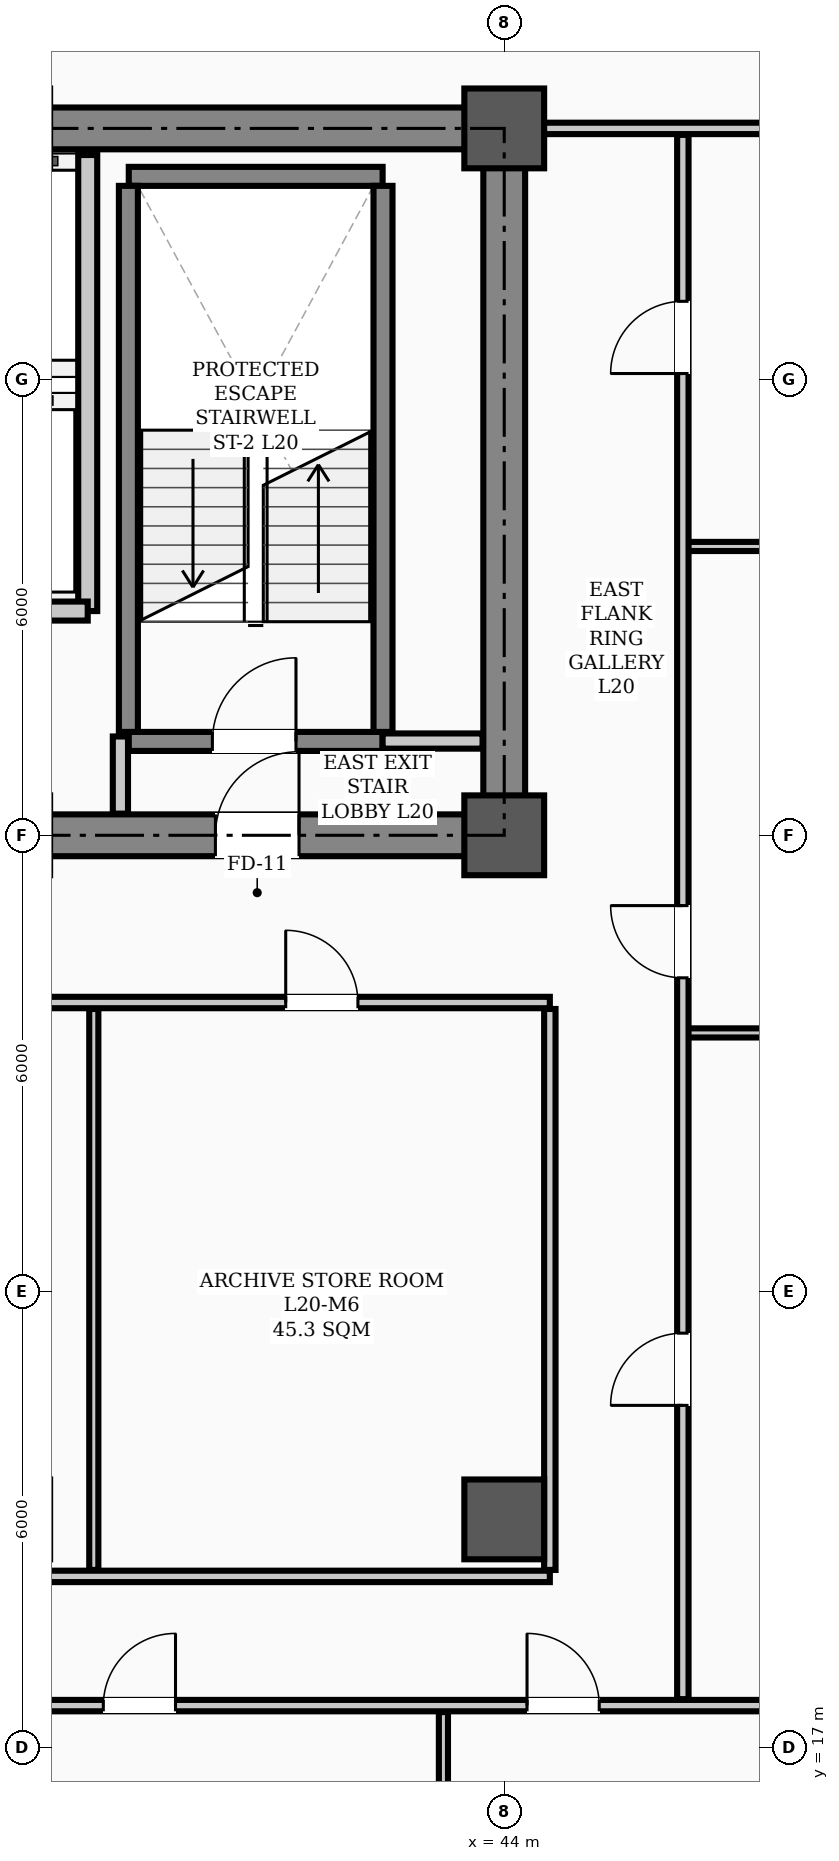
"""IFC4 building model, lengths in metres.
Left out: names, types, materials, properties, quantities, classifications, styles, units other than length and angle.
Written with IfcOpenShell. Run it as: python <this file> out.ifc"""

import sys

from ifc_helpers import new_model, si_unit, direction, frame, frame_2d, origin, origin_2d, place, context, subcontext, project, spatial, rectangle, hollow_rectangle, extrude, element, fill, save


model = new_model("IFC4")
c1 = context("Model", 3, precision=1e-05, world=origin(), true_north=direction((0.0, 1.0)))
c2 = subcontext(c1, "Body", "Model", "MODEL_VIEW")
j1 = project(units=[si_unit("LENGTHUNIT", "METRE"), si_unit("PLANEANGLEUNIT", "RADIAN")], contexts=[c1])
p1 = place(None, origin())
s1 = spatial("IfcSite", under=j1, at=p1, CompositionType="ELEMENT")
p2 = place(p1, origin())
s2 = spatial("IfcBuilding", under=s1, at=p2, CompositionType="ELEMENT")
p3 = place(p2, frame((0.0, 0.0, 81.1)))
s3 = spatial("IfcBuildingStorey", under=s2, at=p3, CompositionType="ELEMENT", Elevation=81.1)
for number, where, z_axis, x_axis in (
    (1, (44.0, 29.0, 0.0), (0.0, 0.0, 1.0), (1.0, 0.0, 0.0)),
    (2, (44.0, 38.3, 0.0), (0.0, 0.0, 1.0), (1.0, 0.0, 0.0)),
    (3, (44.0, 20.0, 0.0), (0.0, 0.0, 1.0), (1.0, 0.0, 0.0)),
):
    element("IfcColumn", number, at=place(p3, frame(where, z_axis=z_axis, x_axis=x_axis)), inside=s3, PredefinedType="COLUMN", context=c2, shape_type="SweptSolid", body=[
        extrude(hollow_rectangle(XDim=1.05, YDim=1.05, WallThickness=0.038, InnerFilletRadius=0.019, OuterFilletRadius=0.057, at=origin_2d()), origin(), (0.0, 0.0, 1.0), 3.9),
    ])
p4 = place(p3, frame((13.5, 29.0, 0.0), z_axis=(0.0, 0.0, 1.0), x_axis=(1.0, 0.0, 0.0)))
e4 = element("IfcWall", 4, at=p4, inside=s3, PredefinedType="SHEAR", context=c2, shape_type="SweptSolid", body=[
    extrude(rectangle(XDim=30.5, YDim=0.55, at=frame_2d((15.25, 0.0))), origin(), (0.0, 0.0, 1.0), 3.72),
])
p5 = place(p4, frame((1.75, 0.0, 0.0)))
e5 = element("IfcOpeningElement", 5, at=p5, cuts=e4, PredefinedType="OPENING", context=c2, shape_type="SweptSolid", body=[
    extrude(rectangle(XDim=1.1, YDim=2.08, at=frame_2d((0.55, 1.04))), frame((0.0, 0.285, 0.0), z_axis=(0.0, -1.0, 0.0), x_axis=(1.0, 0.0, 0.0)), (0.0, 0.0, 1.0), 0.57),
])
p6 = place(p4, frame((26.7, 0.0, 0.0)))
e6 = element("IfcOpeningElement", 6, at=p6, cuts=e4, PredefinedType="OPENING", context=c2, shape_type="SweptSolid", body=[
    extrude(rectangle(XDim=1.1, YDim=2.08, at=frame_2d((0.55, 1.04))), frame((0.0, 0.285, 0.0), z_axis=(0.0, -1.0, 0.0), x_axis=(1.0, 0.0, 0.0)), (0.0, 0.0, 1.0), 0.57),
])
p7 = place(p4, frame((6.8, 0.0, 0.0)))
e7 = element("IfcOpeningElement", 7, at=p7, cuts=e4, PredefinedType="OPENING", context=c2, shape_type="SweptSolid", body=[
    extrude(rectangle(XDim=1.1, YDim=2.08, at=frame_2d((0.55, 1.04))), frame((0.0, 0.285, 0.0), z_axis=(0.0, -1.0, 0.0), x_axis=(1.0, 0.0, 0.0)), (0.0, 0.0, 1.0), 0.57),
])
p8 = place(p4, frame((13.2, 0.0, 0.0)))
e8 = element("IfcOpeningElement", 8, at=p8, cuts=e4, PredefinedType="OPENING", context=c2, shape_type="SweptSolid", body=[
    extrude(rectangle(XDim=1.6, YDim=2.08, at=frame_2d((0.8, 1.04))), frame((0.0, 0.285, 0.0), z_axis=(0.0, -1.0, 0.0), x_axis=(1.0, 0.0, 0.0)), (0.0, 0.0, 1.0), 0.57),
])
p9 = place(p4, frame((19.53, 0.0, 0.0)))
e9 = element("IfcOpeningElement", 9, at=p9, cuts=e4, PredefinedType="OPENING", context=c2, shape_type="SweptSolid", body=[
    extrude(rectangle(XDim=0.9, YDim=2.08, at=frame_2d((0.45, 1.04))), frame((0.0, 0.285, 0.0), z_axis=(0.0, -1.0, 0.0), x_axis=(1.0, 0.0, 0.0)), (0.0, 0.0, 1.0), 0.57),
])
p10 = place(p4, frame((21.57, 0.0, 0.0)))
e10 = element("IfcOpeningElement", 10, at=p10, cuts=e4, PredefinedType="OPENING", context=c2, shape_type="SweptSolid", body=[
    extrude(rectangle(XDim=0.9, YDim=2.08, at=frame_2d((0.45, 1.04))), frame((0.0, 0.285, 0.0), z_axis=(0.0, -1.0, 0.0), x_axis=(1.0, 0.0, 0.0)), (0.0, 0.0, 1.0), 0.57),
])
p11 = place(p3, frame((13.5, 38.3, 0.0), z_axis=(0.0, 0.0, 1.0), x_axis=(1.0, 0.0, 0.0)))
e11 = element("IfcWall", 11, at=p11, inside=s3, PredefinedType="SHEAR", context=c2, shape_type="SweptSolid", body=[
    extrude(rectangle(XDim=30.5, YDim=0.55, at=frame_2d((15.25, 0.0))), origin(), (0.0, 0.0, 1.0), 3.72),
])
p12 = place(p3, frame((44.0, 29.35, 0.0), z_axis=(0.0, 0.0, 1.0), x_axis=(0.0, 1.0, 0.0)))
e12 = element("IfcWall", 12, at=p12, inside=s3, PredefinedType="SHEAR", context=c2, shape_type="SweptSolid", body=[
    extrude(rectangle(XDim=8.6, YDim=0.55, at=frame_2d((4.3, 0.0))), origin(), (0.0, 0.0, 1.0), 3.72),
])
p13 = place(p3, frame((39.06, 30.235, 0.0), z_axis=(0.0, 0.0, 1.0), x_axis=(1.0, 0.0, 0.0)))
e13 = element("IfcWall", 13, at=p13, inside=s3, PredefinedType="STANDARD", context=c2, shape_type="SweptSolid", body=[
    extrude(rectangle(XDim=3.34, YDim=0.25, at=frame_2d((1.67, 0.0))), origin(), (0.0, 0.0, 1.0), 3.72),
])
p14 = place(p13, frame((1.1, 0.0, 0.0)))
e14 = element("IfcOpeningElement", 14, at=p14, cuts=e13, PredefinedType="OPENING", context=c2, shape_type="SweptSolid", body=[
    extrude(rectangle(XDim=1.1, YDim=2.08, at=frame_2d((0.55, 1.04))), frame((0.0, 0.135, 0.0), z_axis=(0.0, -1.0, 0.0), x_axis=(1.0, 0.0, 0.0)), (0.0, 0.0, 1.0), 0.27),
])
p15 = place(p3, frame((39.06, 37.669, 0.0), z_axis=(0.0, 0.0, 1.0), x_axis=(1.0, 0.0, 0.0)))
e15 = element("IfcWall", 15, at=p15, inside=s3, PredefinedType="STANDARD", context=c2, shape_type="SweptSolid", body=[
    extrude(rectangle(XDim=3.34, YDim=0.25, at=frame_2d((1.67, 0.0))), origin(), (0.0, 0.0, 1.0), 3.72),
])
for number, where, z_axis, x_axis in (
    (16, (39.055, 30.36, 0.0), (0.0, 0.0, 1.0), (0.0, 1.0, 0.0)),
    (17, (42.405, 30.36, 0.0), (0.0, 0.0, 1.0), (0.0, 1.0, 0.0)),
):
    element("IfcWall", number, at=place(p3, frame(where, z_axis=z_axis, x_axis=x_axis)), inside=s3, PredefinedType="STANDARD", context=c2, shape_type="SweptSolid", body=[
        extrude(rectangle(XDim=7.184, YDim=0.25, at=frame_2d((3.592, 0.0))), origin(), (0.0, 0.0, 1.0), 3.72),
    ])
p16 = place(p3, frame((38.52, 31.95, 0.0), z_axis=(0.0, 0.0, 1.0), x_axis=(0.0, 1.0, 0.0)))
e18 = element("IfcWall", 18, at=p16, inside=s3, PredefinedType="STANDARD", context=c2, shape_type="SweptSolid", body=[
    extrude(rectangle(XDim=6.0, YDim=0.25, at=frame_2d((3.0, 0.0))), origin(), (0.0, 0.0, 1.0), 3.3),
])
p17 = place(p3, frame((36.62, 31.95, 0.0), z_axis=(0.0, 0.0, 1.0), x_axis=(1.0, 0.0, 0.0)))
e19 = element("IfcWall", 19, at=p17, inside=s3, PredefinedType="STANDARD", context=c2, shape_type="SweptSolid", body=[
    extrude(rectangle(XDim=1.9, YDim=0.25, at=frame_2d((0.95, 0.0))), origin(), (0.0, 0.0, 1.0), 3.48),
])
p18 = place(p3, frame((42.4, 30.24, 0.0), z_axis=(0.0, 0.0, 1.0), x_axis=(1.0, 0.0, 0.0)))
e20 = element("IfcWall", 20, at=p18, inside=s3, PredefinedType="STANDARD", context=c2, shape_type="SweptSolid", body=[
    extrude(rectangle(XDim=1.315, YDim=0.2, at=frame_2d((0.658, 0.0))), origin(), (0.0, 0.0, 1.0), 3.1),
])
p19 = place(p3, frame((12.9, 26.8, 0.0), z_axis=(0.0, 0.0, 1.0), x_axis=(1.0, 0.0, 0.0)))
e21 = element("IfcWall", 21, at=p19, inside=s3, PredefinedType="PARTITIONING", context=c2, shape_type="SweptSolid", body=[
    extrude(rectangle(XDim=31.7, YDim=0.15, at=frame_2d((15.85, 0.0))), origin(), (0.0, 0.0, 1.0), 3.1),
])
p20 = place(p19, frame((13.6, 0.0, 0.0)))
e22 = element("IfcOpeningElement", 22, at=p20, cuts=e21, PredefinedType="OPENING", context=c2, shape_type="SweptSolid", body=[
    extrude(rectangle(XDim=1.6, YDim=2.08, at=frame_2d((0.8, 1.04))), frame((0.0, 0.085, 0.0), z_axis=(0.0, -1.0, 0.0), x_axis=(1.0, 0.0, 0.0)), (0.0, 0.0, 1.0), 0.17),
])
p21 = place(p19, frame((1.875, 0.0, 0.0)))
e23 = element("IfcOpeningElement", 23, at=p21, cuts=e21, PredefinedType="OPENING", context=c2, shape_type="SweptSolid", body=[
    extrude(rectangle(XDim=0.95, YDim=2.08, at=frame_2d((0.475, 1.04))), frame((0.0, 0.085, 0.0), z_axis=(0.0, -1.0, 0.0), x_axis=(1.0, 0.0, 0.0)), (0.0, 0.0, 1.0), 0.17),
])
p22 = place(p19, frame((6.425, 0.0, 0.0)))
e24 = element("IfcOpeningElement", 24, at=p22, cuts=e21, PredefinedType="OPENING", context=c2, shape_type="SweptSolid", body=[
    extrude(rectangle(XDim=0.95, YDim=2.08, at=frame_2d((0.475, 1.04))), frame((0.0, 0.085, 0.0), z_axis=(0.0, -1.0, 0.0), x_axis=(1.0, 0.0, 0.0)), (0.0, 0.0, 1.0), 0.17),
])
p23 = place(p19, frame((10.725, 0.0, 0.0)))
e25 = element("IfcOpeningElement", 25, at=p23, cuts=e21, PredefinedType="OPENING", context=c2, shape_type="SweptSolid", body=[
    extrude(rectangle(XDim=0.95, YDim=2.08, at=frame_2d((0.475, 1.04))), frame((0.0, 0.085, 0.0), z_axis=(0.0, -1.0, 0.0), x_axis=(1.0, 0.0, 0.0)), (0.0, 0.0, 1.0), 0.17),
])
p24 = place(p19, frame((16.075, 0.0, 0.0)))
e26 = element("IfcOpeningElement", 26, at=p24, cuts=e21, PredefinedType="OPENING", context=c2, shape_type="SweptSolid", body=[
    extrude(rectangle(XDim=0.95, YDim=2.08, at=frame_2d((0.475, 1.04))), frame((0.0, 0.085, 0.0), z_axis=(0.0, -1.0, 0.0), x_axis=(1.0, 0.0, 0.0)), (0.0, 0.0, 1.0), 0.17),
])
p25 = place(p19, frame((22.225, 0.0, 0.0)))
e27 = element("IfcOpeningElement", 27, at=p25, cuts=e21, PredefinedType="OPENING", context=c2, shape_type="SweptSolid", body=[
    extrude(rectangle(XDim=0.95, YDim=2.08, at=frame_2d((0.475, 1.04))), frame((0.0, 0.085, 0.0), z_axis=(0.0, -1.0, 0.0), x_axis=(1.0, 0.0, 0.0)), (0.0, 0.0, 1.0), 0.17),
])
p26 = place(p19, frame((28.225, 0.0, 0.0)))
e28 = element("IfcOpeningElement", 28, at=p26, cuts=e21, PredefinedType="OPENING", context=c2, shape_type="SweptSolid", body=[
    extrude(rectangle(XDim=0.95, YDim=2.08, at=frame_2d((0.475, 1.04))), frame((0.0, 0.085, 0.0), z_axis=(0.0, -1.0, 0.0), x_axis=(1.0, 0.0, 0.0)), (0.0, 0.0, 1.0), 0.17),
])
p27 = place(p3, frame((7.81, 17.55, 0.0), z_axis=(0.0, 0.0, 1.0), x_axis=(1.0, 0.0, 0.0)))
e29 = element("IfcWall", 29, at=p27, inside=s3, PredefinedType="PARTITIONING", context=c2, shape_type="SweptSolid", body=[
    extrude(rectangle(XDim=49.38, YDim=0.15, at=frame_2d((24.69, 0.0))), origin(), (0.0, 0.0, 1.0), 3.1),
])
p28 = place(p27, frame((7.815, 0.0, 0.0)))
e30 = element("IfcOpeningElement", 30, at=p28, cuts=e29, PredefinedType="OPENING", context=c2, shape_type="SweptSolid", body=[
    extrude(rectangle(XDim=0.95, YDim=2.08, at=frame_2d((0.475, 1.04))), frame((0.0, 0.085, 0.0), z_axis=(0.0, -1.0, 0.0), x_axis=(1.0, 0.0, 0.0)), (0.0, 0.0, 1.0), 0.17),
])
p29 = place(p27, frame((13.815, 0.0, 0.0)))
e31 = element("IfcOpeningElement", 31, at=p29, cuts=e29, PredefinedType="OPENING", context=c2, shape_type="SweptSolid", body=[
    extrude(rectangle(XDim=0.95, YDim=2.08, at=frame_2d((0.475, 1.04))), frame((0.0, 0.085, 0.0), z_axis=(0.0, -1.0, 0.0), x_axis=(1.0, 0.0, 0.0)), (0.0, 0.0, 1.0), 0.17),
])
p30 = place(p27, frame((20.715, 0.0, 0.0)))
e32 = element("IfcOpeningElement", 32, at=p30, cuts=e29, PredefinedType="OPENING", context=c2, shape_type="SweptSolid", body=[
    extrude(rectangle(XDim=0.95, YDim=2.08, at=frame_2d((0.475, 1.04))), frame((0.0, 0.085, 0.0), z_axis=(0.0, -1.0, 0.0), x_axis=(1.0, 0.0, 0.0)), (0.0, 0.0, 1.0), 0.17),
])
p31 = place(p27, frame((30.915, 0.0, 0.0)))
e33 = element("IfcOpeningElement", 33, at=p31, cuts=e29, PredefinedType="OPENING", context=c2, shape_type="SweptSolid", body=[
    extrude(rectangle(XDim=0.95, YDim=2.08, at=frame_2d((0.475, 1.04))), frame((0.0, 0.085, 0.0), z_axis=(0.0, -1.0, 0.0), x_axis=(1.0, 0.0, 0.0)), (0.0, 0.0, 1.0), 0.17),
])
p32 = place(p27, frame((36.49, 0.0, 0.0)))
e34 = element("IfcOpeningElement", 34, at=p32, cuts=e29, PredefinedType="OPENING", context=c2, shape_type="SweptSolid", body=[
    extrude(rectangle(XDim=0.95, YDim=2.08, at=frame_2d((0.475, 1.04))), frame((0.0, 0.085, 0.0), z_axis=(0.0, -1.0, 0.0), x_axis=(1.0, 0.0, 0.0)), (0.0, 0.0, 1.0), 0.17),
])
p33 = place(p3, frame((28.4, 19.25, 0.0), z_axis=(0.0, 0.0, 1.0), x_axis=(1.0, 0.0, 0.0)))
e35 = element("IfcWall", 35, at=p33, inside=s3, PredefinedType="PARTITIONING", context=c2, shape_type="SweptSolid", body=[
    extrude(rectangle(XDim=16.2, YDim=0.15, at=frame_2d((8.1, 0.0))), origin(), (0.0, 0.0, 1.0), 3.1),
])
p34 = place(p3, frame((44.0, 38.3, 0.0), z_axis=(0.0, 0.0, 1.0), x_axis=(1.0, 0.0, 0.0)))
e36 = element("IfcWall", 36, at=p34, inside=s3, PredefinedType="PARTITIONING", context=c2, shape_type="SweptSolid", body=[
    extrude(rectangle(XDim=13.19, YDim=0.15, at=frame_2d((6.595, 0.0))), origin(), (0.0, 0.0, 1.0), 3.0),
])
for number, where, z_axis, x_axis in (
    (37, (46.35, 26.4, 0.0), (0.0, 0.0, 1.0), (1.0, 0.0, 0.0)),
    (38, (46.35, 32.8, 0.0), (0.0, 0.0, 1.0), (1.0, 0.0, 0.0)),
):
    element("IfcWall", number, at=place(p3, frame(where, z_axis=z_axis, x_axis=x_axis)), inside=s3, PredefinedType="PARTITIONING", context=c2, shape_type="SweptSolid", body=[
        extrude(rectangle(XDim=10.84, YDim=0.12, at=frame_2d((5.42, 0.0))), origin(), (0.0, 0.0, 1.0), 3.212),
    ])
p35 = place(p3, frame((38.95, 29.285, 0.0), z_axis=(0.0, 0.0, 1.0), x_axis=(0.0, 1.0, 0.0)))
e39 = element("IfcWall", 39, at=p35, inside=s3, PredefinedType="STANDARD", context=c2, shape_type="SweptSolid", body=[
    extrude(rectangle(XDim=1.015, YDim=0.2, at=frame_2d((0.508, 0.0))), origin(), (0.0, 0.0, 1.0), 3.3),
])
p36 = place(p3, frame((46.35, 17.635, 0.0), z_axis=(0.0, 0.0, 1.0), x_axis=(0.0, 1.0, 0.0)))
e40 = element("IfcWall", 40, at=p36, inside=s3, PredefinedType="PARTITIONING", context=c2, shape_type="SweptSolid", body=[
    extrude(rectangle(XDim=20.58, YDim=0.15, at=frame_2d((10.29, 0.0))), origin(), (0.0, 0.0, 1.0), 3.0),
])
p37 = place(p36, frame((3.865, 0.0, 0.0)))
e41 = element("IfcOpeningElement", 41, at=p37, cuts=e40, PredefinedType="OPENING", context=c2, shape_type="SweptSolid", body=[
    extrude(rectangle(XDim=0.95, YDim=2.08, at=frame_2d((0.475, 1.04))), frame((0.0, 0.085, 0.0), z_axis=(0.0, -1.0, 0.0), x_axis=(1.0, 0.0, 0.0)), (0.0, 0.0, 1.0), 0.17),
])
p38 = place(p36, frame((9.49, 0.0, 0.0)))
e42 = element("IfcOpeningElement", 42, at=p38, cuts=e40, PredefinedType="OPENING", context=c2, shape_type="SweptSolid", body=[
    extrude(rectangle(XDim=0.95, YDim=2.08, at=frame_2d((0.475, 1.04))), frame((0.0, 0.085, 0.0), z_axis=(0.0, -1.0, 0.0), x_axis=(1.0, 0.0, 0.0)), (0.0, 0.0, 1.0), 0.17),
])
p39 = place(p36, frame((17.44, 0.0, 0.0)))
e43 = element("IfcOpeningElement", 43, at=p39, cuts=e40, PredefinedType="OPENING", context=c2, shape_type="SweptSolid", body=[
    extrude(rectangle(XDim=0.95, YDim=2.08, at=frame_2d((0.475, 1.04))), frame((0.0, 0.085, 0.0), z_axis=(0.0, -1.0, 0.0), x_axis=(1.0, 0.0, 0.0)), (0.0, 0.0, 1.0), 0.17),
])
p40 = place(p3, frame((44.6, 19.335, 0.0), z_axis=(0.0, 0.0, 1.0), x_axis=(0.0, 1.0, 0.0)))
e44 = element("IfcWall", 44, at=p40, inside=s3, PredefinedType="PARTITIONING", context=c2, shape_type="SweptSolid", body=[
    extrude(rectangle(XDim=7.38, YDim=0.15, at=frame_2d((3.69, 0.0))), origin(), (0.0, 0.0, 1.0), 3.0),
])
p41 = place(p3, frame((43.2, 9.81, 0.0), z_axis=(0.0, 0.0, 1.0), x_axis=(0.0, 1.0, 0.0)))
e45 = element("IfcWall", 45, at=p41, inside=s3, PredefinedType="PARTITIONING", context=c2, shape_type="SweptSolid", body=[
    extrude(rectangle(XDim=7.655, YDim=0.12, at=frame_2d((3.828, 0.0))), origin(), (0.0, 0.0, 1.0), 3.212),
])
p42 = place(p3, frame((38.6, 19.335, 0.0), z_axis=(0.0, 0.0, 1.0), x_axis=(0.0, 1.0, 0.0)))
e46 = element("IfcWall", 46, at=p42, inside=s3, PredefinedType="PARTITIONING", context=c2, shape_type="SweptSolid", body=[
    extrude(rectangle(XDim=7.38, YDim=0.12, at=frame_2d((3.69, 0.0))), origin(), (0.0, 0.0, 1.0), 3.0),
])
p43 = place(p14, origin())
e47 = element("IfcDoor", 47, at=p43, inside=s3, OperationType="SINGLE_SWING_RIGHT", PredefinedType="DOOR", context=c2, shape_type="SweptSolid", body=[
    extrude(rectangle(XDim=1.1, YDim=2.08, at=frame_2d((0.55, 1.04))), frame((0.0, 0.025, 0.0), z_axis=(0.0, -1.0, 0.0), x_axis=(1.0, 0.0, 0.0)), (0.0, 0.0, 1.0), 0.05),
])
fill(e14, e47)
p44 = place(p6, origin())
e48 = element("IfcDoor", 48, at=p44, inside=s3, OperationType="SINGLE_SWING_RIGHT", PredefinedType="DOOR", context=c2, shape_type="SweptSolid", body=[
    extrude(rectangle(XDim=1.1, YDim=2.08, at=frame_2d((0.55, 1.04))), frame((0.0, 0.025, 0.0), z_axis=(0.0, -1.0, 0.0), x_axis=(1.0, 0.0, 0.0)), (0.0, 0.0, 1.0), 0.05),
])
fill(e6, e48)
p45 = place(p31, origin())
e49 = element("IfcDoor", 49, at=p45, inside=s3, OperationType="SINGLE_SWING_RIGHT", PredefinedType="DOOR", context=c2, shape_type="SweptSolid", body=[
    extrude(rectangle(XDim=0.95, YDim=2.08, at=frame_2d((0.475, 1.04))), frame((0.0, 0.025, 0.0), z_axis=(0.0, -1.0, 0.0), x_axis=(1.0, 0.0, 0.0)), (0.0, 0.0, 1.0), 0.05),
])
fill(e33, e49)
p46 = place(p32, origin())
e50 = element("IfcDoor", 50, at=p46, inside=s3, OperationType="SINGLE_SWING_LEFT", PredefinedType="DOOR", context=c2, shape_type="SweptSolid", body=[
    extrude(rectangle(XDim=0.95, YDim=2.08, at=frame_2d((0.475, 1.04))), frame((0.0, 0.025, 0.0), z_axis=(0.0, -1.0, 0.0), x_axis=(1.0, 0.0, 0.0)), (0.0, 0.0, 1.0), 0.05),
])
fill(e34, e50)
p47 = place(p26, origin())
e51 = element("IfcDoor", 51, at=p47, inside=s3, OperationType="SINGLE_SWING_LEFT", PredefinedType="DOOR", context=c2, shape_type="SweptSolid", body=[
    extrude(rectangle(XDim=0.95, YDim=2.08, at=frame_2d((0.475, 1.04))), frame((0.0, 0.025, 0.0), z_axis=(0.0, -1.0, 0.0), x_axis=(1.0, 0.0, 0.0)), (0.0, 0.0, 1.0), 0.05),
])
fill(e28, e51)
p48 = place(p37, origin())
e52 = element("IfcDoor", 52, at=p48, inside=s3, OperationType="SINGLE_SWING_LEFT", PredefinedType="DOOR", context=c2, shape_type="SweptSolid", body=[
    extrude(rectangle(XDim=0.95, YDim=2.08, at=frame_2d((0.475, 1.04))), frame((0.0, 0.025, 0.0), z_axis=(0.0, -1.0, 0.0), x_axis=(1.0, 0.0, 0.0)), (0.0, 0.0, 1.0), 0.05),
])
fill(e41, e52)
p49 = place(p38, origin())
e53 = element("IfcDoor", 53, at=p49, inside=s3, OperationType="SINGLE_SWING_RIGHT", PredefinedType="DOOR", context=c2, shape_type="SweptSolid", body=[
    extrude(rectangle(XDim=0.95, YDim=2.08, at=frame_2d((0.475, 1.04))), frame((0.0, 0.025, 0.0), z_axis=(0.0, -1.0, 0.0), x_axis=(1.0, 0.0, 0.0)), (0.0, 0.0, 1.0), 0.05),
])
fill(e42, e53)
p50 = place(p39, origin())
e54 = element("IfcDoor", 54, at=p50, inside=s3, OperationType="SINGLE_SWING_LEFT", PredefinedType="DOOR", context=c2, shape_type="SweptSolid", body=[
    extrude(rectangle(XDim=0.95, YDim=2.08, at=frame_2d((0.475, 1.04))), frame((0.0, 0.025, 0.0), z_axis=(0.0, -1.0, 0.0), x_axis=(1.0, 0.0, 0.0)), (0.0, 0.0, 1.0), 0.05),
])
fill(e43, e54)
save(model, sys.argv[1])
